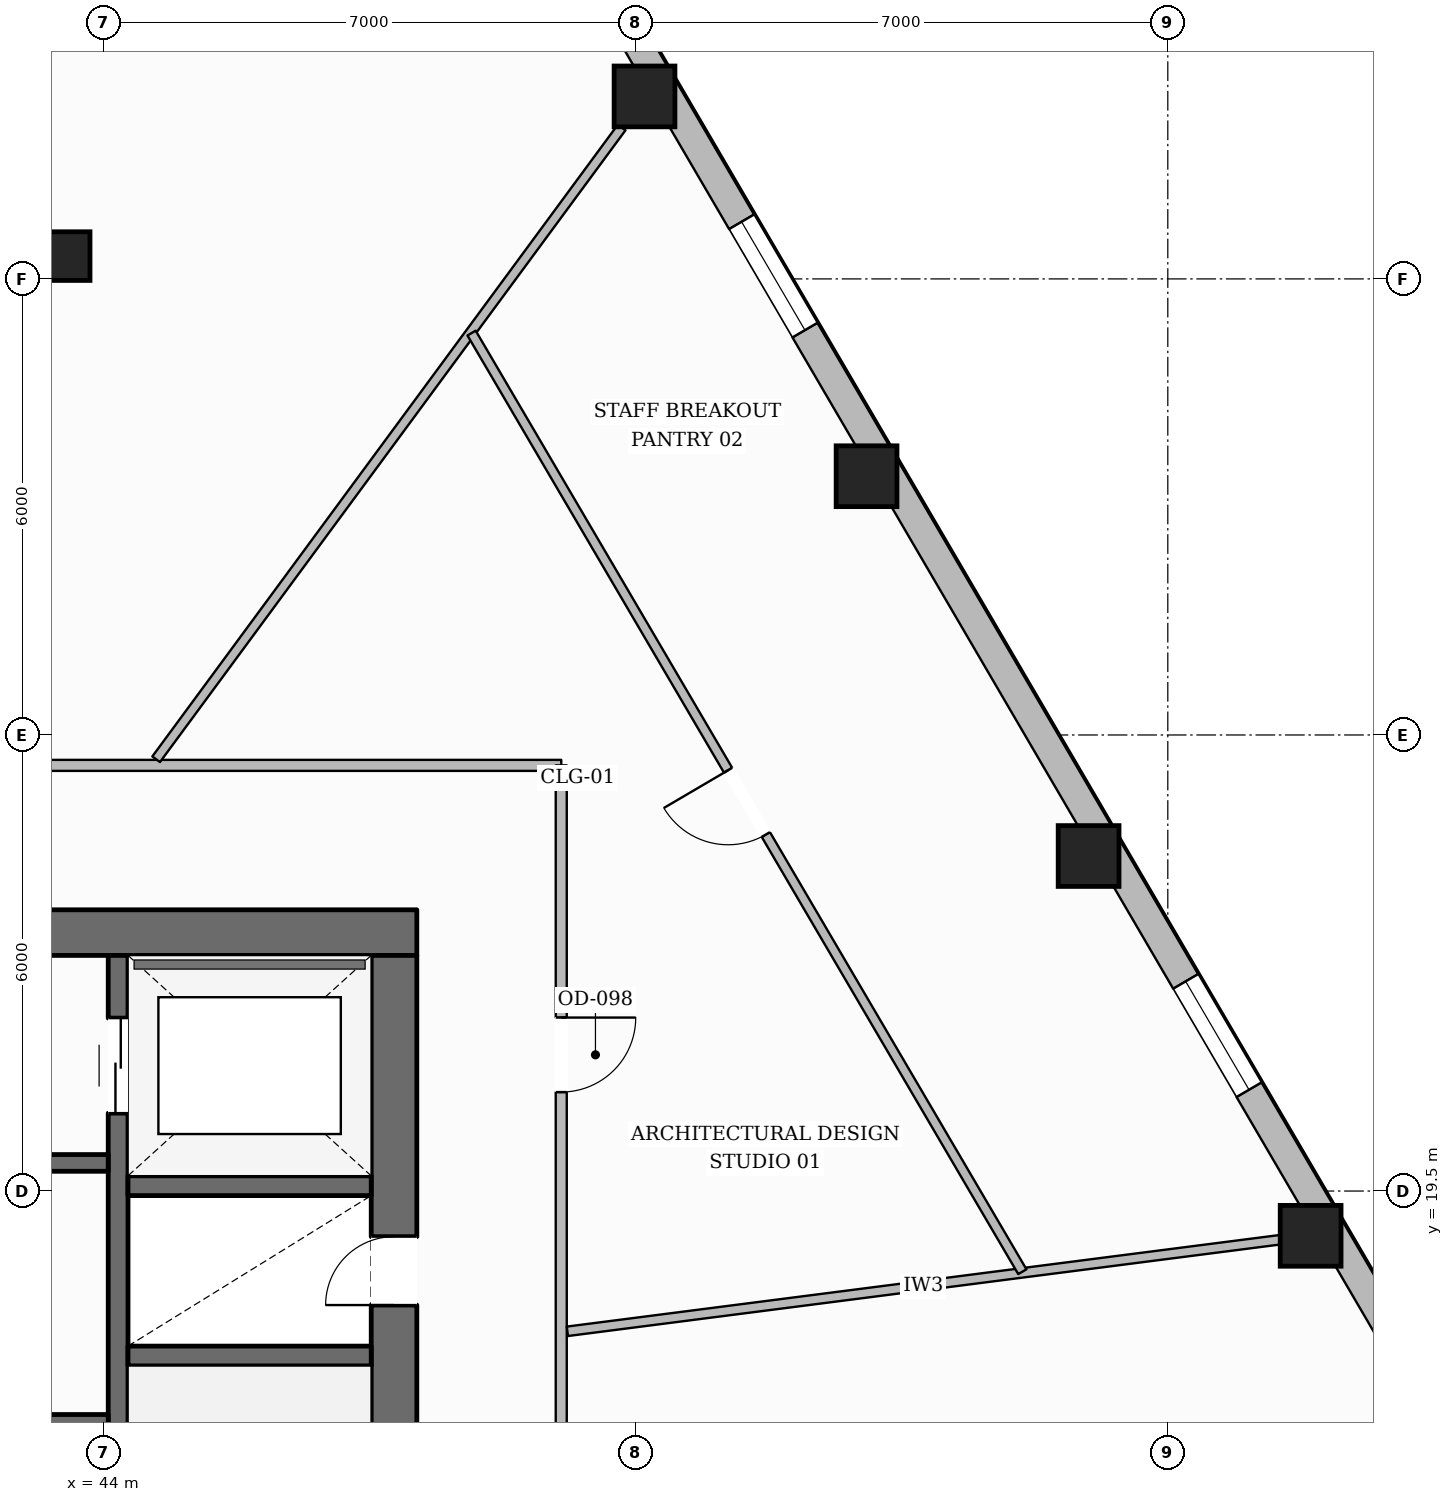
"""IFC4 building model, lengths in metres.
Left out: names, types, materials, properties, quantities, classifications, styles, units other than length and angle.
Written with IfcOpenShell. Run it as: python <this file> out.ifc"""

import sys

from ifc_helpers import new_model, si_unit, direction, frame, frame_2d, origin, origin_2d, place, context, subcontext, project, spatial, rectangle, hollow_rectangle, extrude, element, fill, save


model = new_model("IFC4")
c1 = context("Model", 3, precision=1e-05, world=origin(), true_north=direction((0.0, 1.0)))
c2 = subcontext(c1, "Body", "Model", "MODEL_VIEW")
j1 = project(units=[si_unit("LENGTHUNIT", "METRE"), si_unit("PLANEANGLEUNIT", "RADIAN")], contexts=[c1])
p1 = place(None, origin())
s1 = spatial("IfcSite", under=j1, at=p1, CompositionType="ELEMENT")
p2 = place(p1, origin())
s2 = spatial("IfcBuilding", under=s1, at=p2, CompositionType="ELEMENT")
p3 = place(p2, frame((0.0, 0.0, 59.9)))
s3 = spatial("IfcBuildingStorey", under=s2, at=p3, CompositionType="ELEMENT", Elevation=59.9)
p4 = place(p3, frame((27.88, 22.9, 0.0), z_axis=(0.0, 0.0, 1.0), x_axis=(1.0, 0.0, 0.0)))
e1 = element("IfcWall", 1, at=p4, inside=s3, PredefinedType="SOLIDWALL", context=c2, shape_type="SweptSolid", body=[
    extrude(rectangle(XDim=20.24, YDim=0.6, at=frame_2d((10.12, 0.0))), origin(), (0.0, 0.0, 1.0), 3.59),
])
p5 = place(p4, frame((6.395, 0.0, 0.0)))
e2 = element("IfcOpeningElement", 2, at=p5, cuts=e1, PredefinedType="OPENING", context=c2, shape_type="SweptSolid", body=[
    extrude(rectangle(XDim=1.05, YDim=2.15, at=frame_2d((0.525, 1.075))), frame((0.0, 0.31, 0.0), z_axis=(0.0, -1.0, 0.0), x_axis=(1.0, 0.0, 0.0)), (0.0, 0.0, 1.0), 0.62),
])
p6 = place(p4, frame((12.795, 0.0, 0.0)))
e3 = element("IfcOpeningElement", 3, at=p6, cuts=e1, PredefinedType="OPENING", context=c2, shape_type="SweptSolid", body=[
    extrude(rectangle(XDim=1.05, YDim=2.15, at=frame_2d((0.525, 1.075))), frame((0.0, 0.31, 0.0), z_axis=(0.0, -1.0, 0.0), x_axis=(1.0, 0.0, 0.0)), (0.0, 0.0, 1.0), 0.62),
])
p7 = place(p3, frame((47.82, 9.6, 0.0), z_axis=(0.0, 0.0, 1.0), x_axis=(0.0, 1.0, 0.0)))
e4 = element("IfcWall", 4, at=p7, inside=s3, PredefinedType="SOLIDWALL", context=c2, shape_type="SweptSolid", body=[
    extrude(rectangle(XDim=13.0, YDim=0.6, at=frame_2d((6.5, 0.0))), origin(), (0.0, 0.0, 1.0), 3.59),
])
p8 = place(p7, frame((0.2, 0.0, 0.0)))
e5 = element("IfcOpeningElement", 5, at=p8, cuts=e4, PredefinedType="OPENING", context=c2, shape_type="SweptSolid", body=[
    extrude(rectangle(XDim=1.1, YDim=2.15, at=frame_2d((0.55, 1.075))), frame((0.0, 0.31, 0.0), z_axis=(0.0, -1.0, 0.0), x_axis=(1.0, 0.0, 0.0)), (0.0, 0.0, 1.0), 0.62),
])
p9 = place(p7, frame((8.4, 0.0, 0.0)))
e6 = element("IfcOpeningElement", 6, at=p9, cuts=e4, PredefinedType="OPENING", context=c2, shape_type="SweptSolid", body=[
    extrude(rectangle(XDim=0.9, YDim=2.1, at=frame_2d((0.45, 1.05))), frame((0.0, 0.31, 0.0), z_axis=(0.0, -1.0, 0.0), x_axis=(1.0, 0.0, 0.0)), (0.0, 0.0, 1.0), 0.62),
])
p10 = place(p3, frame((44.19, 9.6, 0.0), z_axis=(0.0, 0.0, 1.0), x_axis=(0.0, 1.0, 0.0)))
e7 = element("IfcWall", 7, at=p10, inside=s3, PredefinedType="SHEAR", context=c2, shape_type="SweptSolid", body=[
    extrude(rectangle(XDim=13.0, YDim=0.26, at=frame_2d((6.5, 0.0))), origin(), (0.0, 0.0, 1.0), 3.59),
])
p11 = place(p10, frame((10.925, 0.0, 0.0)))
e8 = element("IfcOpeningElement", 8, at=p11, cuts=e7, PredefinedType="OPENING", context=c2, shape_type="SweptSolid", body=[
    extrude(rectangle(XDim=1.25, YDim=2.25, at=frame_2d((0.625, 1.125))), frame((0.0, 0.14, 0.0), z_axis=(0.0, -1.0, 0.0), x_axis=(1.0, 0.0, 0.0)), (0.0, 0.0, 1.0), 0.28),
])
for number, where, z_axis, x_axis in (
    (9, (44.32, 17.33, 0.0), (0.0, 0.0, 1.0), (1.0, 0.0, 0.0)),
    (10, (44.32, 19.57, 0.0), (0.0, 0.0, 1.0), (1.0, 0.0, 0.0)),
):
    element("IfcWall", number, at=place(p3, frame(where, z_axis=z_axis, x_axis=x_axis)), inside=s3, PredefinedType="SHEAR", context=c2, shape_type="SweptSolid", body=[
        extrude(rectangle(XDim=3.2, YDim=0.26, at=frame_2d((1.6, 0.0))), origin(), (0.0, 0.0, 1.0), 3.59),
    ])
p12 = place(p3, frame((31.94, 19.87, 0.0), z_axis=(0.0, 0.0, 1.0), x_axis=(1.0, 0.0, 0.0)))
e11 = element("IfcWall", 11, at=p12, inside=s3, PredefinedType="SOLIDWALL", context=c2, shape_type="SweptSolid", body=[
    extrude(rectangle(XDim=12.12, YDim=0.22, at=frame_2d((6.06, 0.0))), origin(), (0.0, 0.0, 1.0), 3.59),
])
p13 = place(p12, frame((6.3, 0.0, 0.0)))
e12 = element("IfcOpeningElement", 12, at=p13, cuts=e11, PredefinedType="OPENING", context=c2, shape_type="SweptSolid", body=[
    extrude(rectangle(XDim=1.1, YDim=2.15, at=frame_2d((0.55, 1.075))), frame((0.0, 0.12, 0.0), z_axis=(0.0, -1.0, 0.0), x_axis=(1.0, 0.0, 0.0)), (0.0, 0.0, 1.0), 0.24),
])
p14 = place(p12, frame((9.51, 0.0, 0.0)))
e13 = element("IfcOpeningElement", 13, at=p14, cuts=e11, PredefinedType="OPENING", context=c2, shape_type="SweptSolid", body=[
    extrude(rectangle(XDim=0.9, YDim=2.1, at=frame_2d((0.45, 1.05))), frame((0.0, 0.12, 0.0), z_axis=(0.0, -1.0, 0.0), x_axis=(1.0, 0.0, 0.0)), (0.0, 0.0, 1.0), 0.24),
])
p15 = place(p3, frame((31.94, 16.45, 0.0), z_axis=(0.0, 0.0, 1.0), x_axis=(1.0, 0.0, 0.0)))
e14 = element("IfcWall", 14, at=p15, inside=s3, PredefinedType="SOLIDWALL", context=c2, shape_type="SweptSolid", body=[
    extrude(rectangle(XDim=12.12, YDim=0.22, at=frame_2d((6.06, 0.0))), origin(), (0.0, 0.0, 1.0), 3.59),
])
for number, where, z_axis, x_axis in (
    (15, (59.879, 18.911, 0.0), (0.0, 0.0, 1.0), (1.0, 0.0, 0.0)),
    (16, (56.958, 23.908, 0.0), (0.0, 0.0, 1.0), (1.0, 0.0, 0.0)),
    (17, (54.037, 28.904, 0.0), (0.0, 0.0, 1.0), (1.0, 0.0, 0.0)),
    (18, (51.115, 33.901, 0.0), (0.0, 0.0, 1.0), (1.0, 0.0, 0.0)),
):
    element("IfcColumn", number, at=place(p3, frame(where, z_axis=z_axis, x_axis=x_axis)), inside=s3, PredefinedType="COLUMN", context=c2, shape_type="SweptSolid", body=[
        extrude(hollow_rectangle(XDim=0.8, YDim=0.8, WallThickness=0.036, at=origin_2d()), origin(), (0.0, 0.0, 1.0), 3.59),
    ])
p16 = place(p3, frame((43.5, 31.8, 0.0), z_axis=(0.0, 0.0, 1.0), x_axis=(1.0, 0.0, 0.0)))
e19 = element("IfcColumn", 19, at=p16, inside=s3, PredefinedType="COLUMN", context=c2, shape_type="SweptSolid", body=[
    extrude(hollow_rectangle(XDim=0.64, YDim=0.64, WallThickness=0.028, at=origin_2d()), origin(), (0.0, 0.0, 1.0), 3.59),
])
p17 = place(p3, frame((45.267, 44.44, 0.0), z_axis=(0.0, 0.0, 1.0), x_axis=(0.504702471056, -0.863293354376, 0.0)))
e20 = element("IfcWall", 20, at=p17, inside=s3, PredefinedType="STANDARD", context=c2, shape_type="SweptSolid", body=[
    extrude(rectangle(XDim=35.682, YDim=0.38, at=frame_2d((17.841, 0.0))), origin(), (0.0, 0.0, 1.0), 2.97),
])
p18 = place(p17, frame((31.483, 0.0, 0.65)))
e21 = element("IfcOpeningElement", 21, at=p18, cuts=e20, PredefinedType="OPENING", context=c2, shape_type="SweptSolid", body=[
    extrude(rectangle(XDim=1.65, YDim=1.75, at=frame_2d((0.825, 0.875))), frame((0.0, 0.2, 0.0), z_axis=(0.0, -1.0, 0.0), x_axis=(1.0, 0.0, 0.0)), (0.0, 0.0, 1.0), 0.4),
])
p19 = place(p17, frame((25.696, 0.0, 0.65)))
e22 = element("IfcOpeningElement", 22, at=p19, cuts=e20, PredefinedType="OPENING", context=c2, shape_type="SweptSolid", body=[
    extrude(rectangle(XDim=1.65, YDim=1.75, at=frame_2d((0.825, 0.875))), frame((0.0, 0.2, 0.0), z_axis=(0.0, -1.0, 0.0), x_axis=(1.0, 0.0, 0.0)), (0.0, 0.0, 1.0), 0.4),
])
p20 = place(p17, frame((14.12, 0.0, 0.65)))
e23 = element("IfcOpeningElement", 23, at=p20, cuts=e20, PredefinedType="OPENING", context=c2, shape_type="SweptSolid", body=[
    extrude(rectangle(XDim=1.65, YDim=1.75, at=frame_2d((0.825, 0.875))), frame((0.0, 0.2, 0.0), z_axis=(0.0, -1.0, 0.0), x_axis=(1.0, 0.0, 0.0)), (0.0, 0.0, 1.0), 0.4),
])
p21 = place(p17, frame((8.332, 0.0, 0.65)))
e24 = element("IfcOpeningElement", 24, at=p21, cuts=e20, PredefinedType="OPENING", context=c2, shape_type="SweptSolid", body=[
    extrude(rectangle(XDim=1.65, YDim=1.75, at=frame_2d((0.825, 0.875))), frame((0.0, 0.2, 0.0), z_axis=(0.0, -1.0, 0.0), x_axis=(1.0, 0.0, 0.0)), (0.0, 0.0, 1.0), 0.4),
])
p22 = place(p17, frame((2.544, 0.0, 0.65)))
e25 = element("IfcOpeningElement", 25, at=p22, cuts=e20, PredefinedType="OPENING", context=c2, shape_type="SweptSolid", body=[
    extrude(rectangle(XDim=1.65, YDim=1.75, at=frame_2d((0.825, 0.875))), frame((0.0, 0.2, 0.0), z_axis=(0.0, -1.0, 0.0), x_axis=(1.0, 0.0, 0.0)), (0.0, 0.0, 1.0), 0.4),
])
p23 = place(p3, frame((39.0, 25.1, 0.0), z_axis=(0.0, 0.0, 1.0), x_axis=(1.0, 0.0, 0.0)))
e26 = element("IfcWall", 26, at=p23, inside=s3, PredefinedType="PARTITIONING", context=c2, shape_type="SweptSolid", body=[
    extrude(rectangle(XDim=11.02, YDim=0.145, at=frame_2d((5.51, 0.0))), origin(), (0.0, 0.0, 1.0), 3.59),
])
p24 = place(p3, frame((50.02, 25.1, 0.0), z_axis=(0.0, 0.0, 1.0), x_axis=(0.0, -1.0, 0.0)))
e27 = element("IfcWall", 27, at=p24, inside=s3, PredefinedType="PARTITIONING", context=c2, shape_type="SweptSolid", body=[
    extrude(rectangle(XDim=16.0, YDim=0.145, at=frame_2d((8.0, 0.0))), origin(), (0.0, 0.0, 1.0), 3.278),
])
p25 = place(p24, frame((3.318, 0.0, 0.0)))
e28 = element("IfcOpeningElement", 28, at=p25, cuts=e27, PredefinedType="OPENING", context=c2, shape_type="SweptSolid", body=[
    extrude(rectangle(XDim=0.98, YDim=2.15, at=frame_2d((0.49, 1.075))), frame((0.0, 0.083, 0.0), z_axis=(0.0, -1.0, 0.0), x_axis=(1.0, 0.0, 0.0)), (0.0, 0.0, 1.0), 0.165),
])
p26 = place(p3, frame((50.101, 17.655, 0.0), z_axis=(0.0, 0.0, 1.0), x_axis=(0.991847864417, 0.127427680869, 0.0)))
e29 = element("IfcWall", 29, at=p26, inside=s3, PredefinedType="PARTITIONING", context=c2, shape_type="SweptSolid", body=[
    extrude(rectangle(XDim=9.447, YDim=0.125, at=frame_2d((4.724, 0.0))), origin(), (0.0, 0.0, 1.0), 3.057),
])
p27 = place(p3, frame((44.69, 25.18, 0.0), z_axis=(0.0, 0.0, 1.0), x_axis=(0.5931796797, 0.805070101042, 0.0)))
e30 = element("IfcWall", 30, at=p27, inside=s3, PredefinedType="PARTITIONING", context=c2, shape_type="SweptSolid", body=[
    extrude(rectangle(XDim=10.325, YDim=0.125, at=frame_2d((5.163, 0.0))), origin(), (0.0, 0.0, 1.0), 3.057),
])
p28 = place(p3, frame((56.086, 18.439, 0.0), z_axis=(0.0, 0.0, 1.0), x_axis=(-0.506083112793, 0.862484714616, 0.0)))
e31 = element("IfcWall", 31, at=p28, inside=s3, PredefinedType="PARTITIONING", context=c2, shape_type="SweptSolid", body=[
    extrude(rectangle(XDim=14.318, YDim=0.125, at=frame_2d((7.159, 0.0))), origin(), (0.0, 0.0, 1.0), 3.59),
])
p29 = place(p28, frame((6.669, 0.0, 0.0)))
e32 = element("IfcOpeningElement", 32, at=p29, cuts=e31, PredefinedType="OPENING", context=c2, shape_type="SweptSolid", body=[
    extrude(rectangle(XDim=0.98, YDim=2.15, at=frame_2d((0.49, 1.075))), frame((0.0, 0.073, 0.0), z_axis=(0.0, -1.0, 0.0), x_axis=(1.0, 0.0, 0.0)), (0.0, 0.0, 1.0), 0.145),
])
p30 = place(p19, origin())
e33 = element("IfcWindow", 33, at=p30, inside=s3, PartitioningType="SINGLE_PANEL", PredefinedType="WINDOW", context=c2, shape_type="SweptSolid", body=[
    extrude(rectangle(XDim=1.65, YDim=1.75, at=frame_2d((0.825, 0.875))), frame((0.0, 0.03, 0.0), z_axis=(0.0, -1.0, 0.0), x_axis=(1.0, 0.0, 0.0)), (0.0, 0.0, 1.0), 0.06),
])
fill(e22, e33)
p31 = place(p20, origin())
e34 = element("IfcWindow", 34, at=p31, inside=s3, PartitioningType="SINGLE_PANEL", PredefinedType="WINDOW", context=c2, shape_type="SweptSolid", body=[
    extrude(rectangle(XDim=1.65, YDim=1.75, at=frame_2d((0.825, 0.875))), frame((0.0, 0.03, 0.0), z_axis=(0.0, -1.0, 0.0), x_axis=(1.0, 0.0, 0.0)), (0.0, 0.0, 1.0), 0.06),
])
fill(e23, e34)
p32 = place(p9, origin())
e35 = element("IfcDoor", 35, at=p32, inside=s3, OperationType="SINGLE_SWING_LEFT", PredefinedType="DOOR", context=c2, shape_type="SweptSolid", body=[
    extrude(rectangle(XDim=0.9, YDim=2.1, at=frame_2d((0.45, 1.05))), frame((0.0, 0.025, 0.0), z_axis=(0.0, -1.0, 0.0), x_axis=(1.0, 0.0, 0.0)), (0.0, 0.0, 1.0), 0.05),
])
fill(e6, e35)
p33 = place(p11, origin())
e36 = element("IfcDoor", 36, at=p33, inside=s3, OperationType="DOUBLE_DOOR_SLIDING", PredefinedType="DOOR", context=c2, shape_type="SweptSolid", body=[
    extrude(rectangle(XDim=1.25, YDim=2.25, at=frame_2d((0.625, 1.125))), frame((0.0, 0.025, 0.0), z_axis=(0.0, -1.0, 0.0), x_axis=(1.0, 0.0, 0.0)), (0.0, 0.0, 1.0), 0.05),
])
fill(e8, e36)
p34 = place(p25, origin())
e37 = element("IfcDoor", 37, at=p34, inside=s3, OperationType="SINGLE_SWING_LEFT", PredefinedType="DOOR", context=c2, shape_type="SweptSolid", body=[
    extrude(rectangle(XDim=0.98, YDim=2.15, at=frame_2d((0.49, 1.075))), frame((0.0, 0.025, 0.0), z_axis=(0.0, -1.0, 0.0), x_axis=(1.0, 0.0, 0.0)), (0.0, 0.0, 1.0), 0.05),
])
fill(e28, e37)
p35 = place(p29, origin())
e38 = element("IfcDoor", 38, at=p35, inside=s3, OperationType="SINGLE_SWING_RIGHT", PredefinedType="DOOR", context=c2, shape_type="SweptSolid", body=[
    extrude(rectangle(XDim=0.98, YDim=2.15, at=frame_2d((0.49, 1.075))), frame((0.0, 0.025, 0.0), z_axis=(0.0, -1.0, 0.0), x_axis=(1.0, 0.0, 0.0)), (0.0, 0.0, 1.0), 0.05),
])
fill(e32, e38)
save(model, sys.argv[1])
